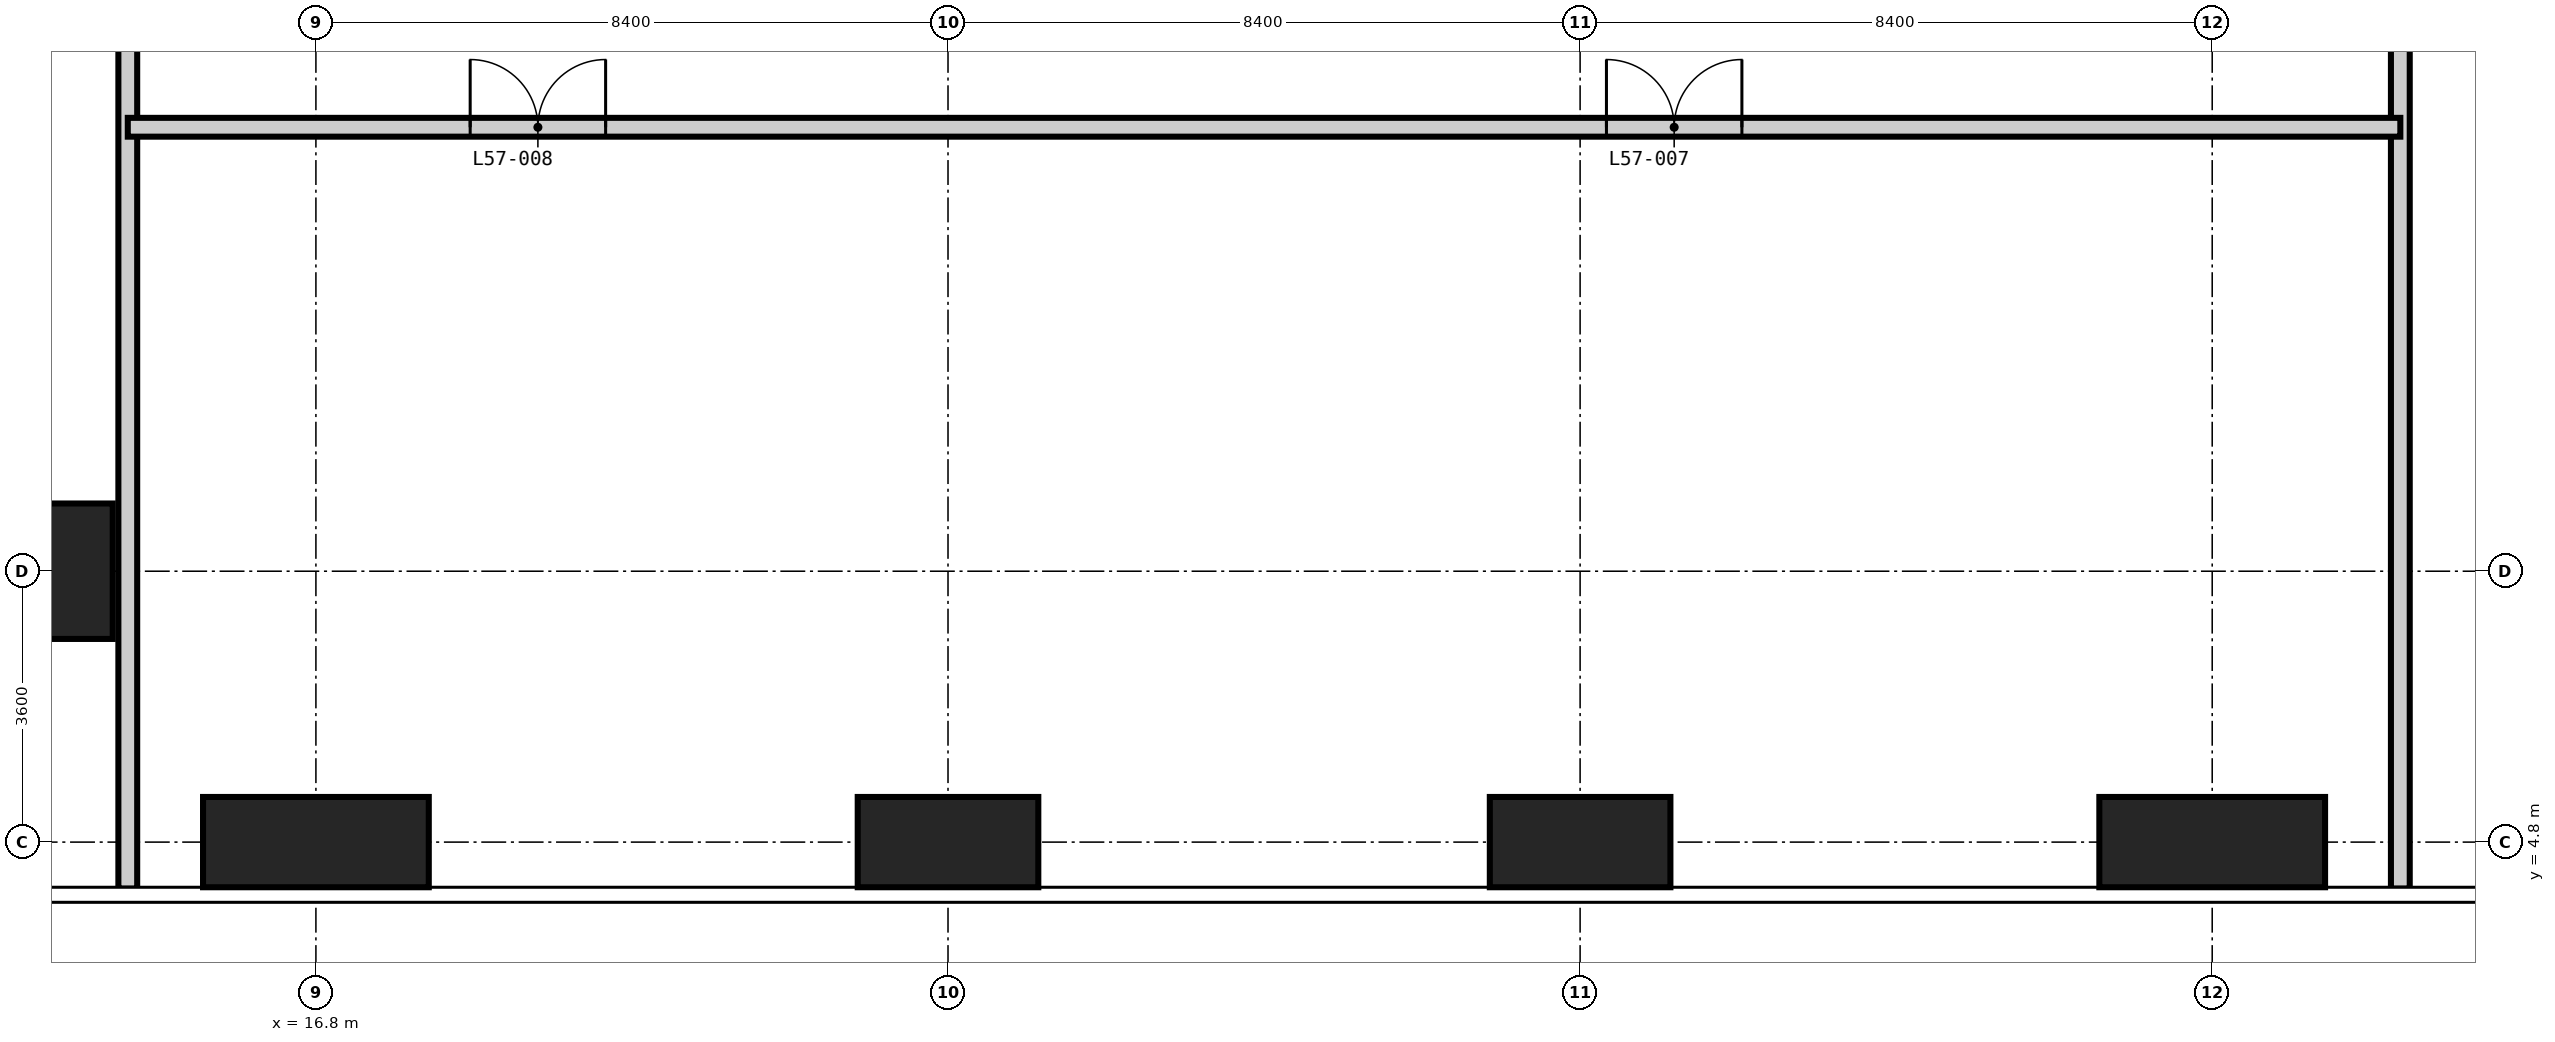
"""IFC4 building model, lengths in metres.
Left out: names, types, materials, properties, quantities, classifications, styles, units other than length and angle.
Written with IfcOpenShell. Run it as: python <this file> out.ifc"""

import sys

from ifc_helpers import new_model, si_unit, direction, frame, frame_2d, origin, origin_2d, place, context, subcontext, project, spatial, rectangle, extrude, element, fill, save


model = new_model("IFC4")
c1 = context("Model", 3, precision=1e-05, world=origin(), true_north=direction((0.0, 1.0)))
c2 = subcontext(c1, "Body", "Model", "MODEL_VIEW")
j1 = project(units=[si_unit("LENGTHUNIT", "METRE"), si_unit("PLANEANGLEUNIT", "RADIAN")], contexts=[c1])
p1 = place(None, origin())
s1 = spatial("IfcSite", under=j1, at=p1, CompositionType="ELEMENT")
p2 = place(p1, origin())
s2 = spatial("IfcBuilding", under=s1, at=p2, CompositionType="ELEMENT")
p3 = place(p2, frame((0.0, 0.0, 220.2)))
s3 = spatial("IfcBuildingStorey", under=s2, at=p3, CompositionType="ELEMENT", Elevation=220.2)
p4 = place(p3, frame((13.2, 8.4, -0.4), z_axis=(0.0, 0.0, 1.0), x_axis=(1.0, 0.0, 0.0)))
e1 = element("IfcColumn", 1, at=p4, inside=s3, PredefinedType="COLUMN", context=c2, shape_type="SweptSolid", body=[
    extrude(rectangle(XDim=1.8, YDim=1.8, at=origin_2d()), origin(), (0.0, 0.0, 1.0), 5.45),
])
p5 = place(p3, frame((16.8, 4.8, -0.4), z_axis=(0.0, 0.0, 1.0), x_axis=(1.0, 0.0, 0.0)))
e2 = element("IfcColumn", 2, at=p5, inside=s3, PredefinedType="COLUMN", context=c2, shape_type="SweptSolid", body=[
    extrude(rectangle(XDim=3.0, YDim=1.2, at=origin_2d()), origin(), (0.0, 0.0, 1.0), 5.45),
])
for number, where, z_axis, x_axis in (
    (3, (25.2, 4.8, -0.4), (0.0, 0.0, 1.0), (1.0, 0.0, 0.0)),
    (4, (33.6, 4.8, -0.4), (0.0, 0.0, 1.0), (1.0, 0.0, 0.0)),
):
    element("IfcColumn", number, at=place(p3, frame(where, z_axis=z_axis, x_axis=x_axis)), inside=s3, PredefinedType="COLUMN", context=c2, shape_type="SweptSolid", body=[
        extrude(rectangle(XDim=2.4, YDim=1.2, at=origin_2d()), origin(), (0.0, 0.0, 1.0), 5.45),
    ])
p6 = place(p3, frame((42.0, 4.8, -0.4), z_axis=(0.0, 0.0, 1.0), x_axis=(1.0, 0.0, 0.0)))
e5 = element("IfcColumn", 5, at=p6, inside=s3, PredefinedType="COLUMN", context=c2, shape_type="SweptSolid", body=[
    extrude(rectangle(XDim=3.0, YDim=1.2, at=origin_2d()), origin(), (0.0, 0.0, 1.0), 5.45),
])
p7 = place(p3, frame((14.3, 4.182, 0.0), z_axis=(0.0, 0.0, 1.0), x_axis=(0.0, 1.0, 0.0)))
e6 = element("IfcWall", 6, at=p7, inside=s3, PredefinedType="PARTITIONING", context=c2, shape_type="SweptSolid", body=[
    extrude(rectangle(XDim=50.436, YDim=0.25, at=frame_2d((25.218, 0.0))), origin(), (0.0, 0.0, 1.0), 5.05),
])
p8 = place(p7, frame((18.268, 0.0, 0.0)))
e7 = element("IfcOpeningElement", 7, at=p8, cuts=e6, PredefinedType="OPENING", context=c2, shape_type="SweptSolid", body=[
    extrude(rectangle(XDim=1.8, YDim=2.4, at=frame_2d((0.9, 1.2))), frame((0.0, 0.135, 0.0), z_axis=(0.0, -1.0, 0.0), x_axis=(1.0, 0.0, 0.0)), (0.0, 0.0, 1.0), 0.27),
])
p9 = place(p7, frame((33.968, 0.0, 0.0)))
e8 = element("IfcOpeningElement", 8, at=p9, cuts=e6, PredefinedType="OPENING", context=c2, shape_type="SweptSolid", body=[
    extrude(rectangle(XDim=1.8, YDim=2.4, at=frame_2d((0.9, 1.2))), frame((0.0, 0.135, 0.0), z_axis=(0.0, -1.0, 0.0), x_axis=(1.0, 0.0, 0.0)), (0.0, 0.0, 1.0), 0.27),
])
p10 = place(p3, frame((44.5, 4.182, 0.0), z_axis=(0.0, 0.0, 1.0), x_axis=(0.0, 1.0, 0.0)))
e9 = element("IfcWall", 9, at=p10, inside=s3, PredefinedType="PARTITIONING", context=c2, shape_type="SweptSolid", body=[
    extrude(rectangle(XDim=50.436, YDim=0.25, at=frame_2d((25.218, 0.0))), origin(), (0.0, 0.0, 1.0), 5.05),
])
p11 = place(p10, frame((14.668, 0.0, 0.0)))
e10 = element("IfcOpeningElement", 10, at=p11, cuts=e9, PredefinedType="OPENING", context=c2, shape_type="SweptSolid", body=[
    extrude(rectangle(XDim=1.8, YDim=2.4, at=frame_2d((0.9, 1.2))), frame((0.0, 0.135, 0.0), z_axis=(0.0, -1.0, 0.0), x_axis=(1.0, 0.0, 0.0)), (0.0, 0.0, 1.0), 0.27),
])
p12 = place(p10, frame((33.968, 0.0, 0.0)))
e11 = element("IfcOpeningElement", 11, at=p12, cuts=e9, PredefinedType="OPENING", context=c2, shape_type="SweptSolid", body=[
    extrude(rectangle(XDim=1.8, YDim=2.4, at=frame_2d((0.9, 1.2))), frame((0.0, 0.135, 0.0), z_axis=(0.0, -1.0, 0.0), x_axis=(1.0, 0.0, 0.0)), (0.0, 0.0, 1.0), 0.27),
])
p13 = place(p3, frame((14.3, 14.3, 0.0), z_axis=(0.0, 0.0, 1.0), x_axis=(1.0, 0.0, 0.0)))
e12 = element("IfcWall", 12, at=p13, inside=s3, PredefinedType="PARTITIONING", context=c2, shape_type="SweptSolid", body=[
    extrude(rectangle(XDim=30.2, YDim=0.25, at=frame_2d((15.1, 0.0))), origin(), (0.0, 0.0, 1.0), 5.05),
])
p14 = place(p13, frame((19.65, 0.0, 0.0)))
e13 = element("IfcOpeningElement", 13, at=p14, cuts=e12, PredefinedType="OPENING", context=c2, shape_type="SweptSolid", body=[
    extrude(rectangle(XDim=1.8, YDim=2.4, at=frame_2d((0.9, 1.2))), frame((0.0, 0.135, 0.0), z_axis=(0.0, -1.0, 0.0), x_axis=(1.0, 0.0, 0.0)), (0.0, 0.0, 1.0), 0.27),
])
p15 = place(p13, frame((4.55, 0.0, 0.0)))
e14 = element("IfcOpeningElement", 14, at=p15, cuts=e12, PredefinedType="OPENING", context=c2, shape_type="SweptSolid", body=[
    extrude(rectangle(XDim=1.8, YDim=2.4, at=frame_2d((0.9, 1.2))), frame((0.0, 0.135, 0.0), z_axis=(0.0, -1.0, 0.0), x_axis=(1.0, 0.0, 0.0)), (0.0, 0.0, 1.0), 0.27),
])
p16 = place(p14, origin())
e15 = element("IfcDoor", 15, at=p16, inside=s3, OperationType="DOUBLE_DOOR_DOUBLE_SWING", PredefinedType="DOOR", context=c2, shape_type="SweptSolid", body=[
    extrude(rectangle(XDim=1.8, YDim=2.4, at=frame_2d((0.9, 1.2))), frame((0.0, 0.025, 0.0), z_axis=(0.0, -1.0, 0.0), x_axis=(1.0, 0.0, 0.0)), (0.0, 0.0, 1.0), 0.05),
])
fill(e13, e15)
p17 = place(p15, origin())
e16 = element("IfcDoor", 16, at=p17, inside=s3, OperationType="DOUBLE_DOOR_DOUBLE_SWING", PredefinedType="DOOR", context=c2, shape_type="SweptSolid", body=[
    extrude(rectangle(XDim=1.8, YDim=2.4, at=frame_2d((0.9, 1.2))), frame((0.0, 0.025, 0.0), z_axis=(0.0, -1.0, 0.0), x_axis=(1.0, 0.0, 0.0)), (0.0, 0.0, 1.0), 0.05),
])
fill(e14, e16)
save(model, sys.argv[1])
